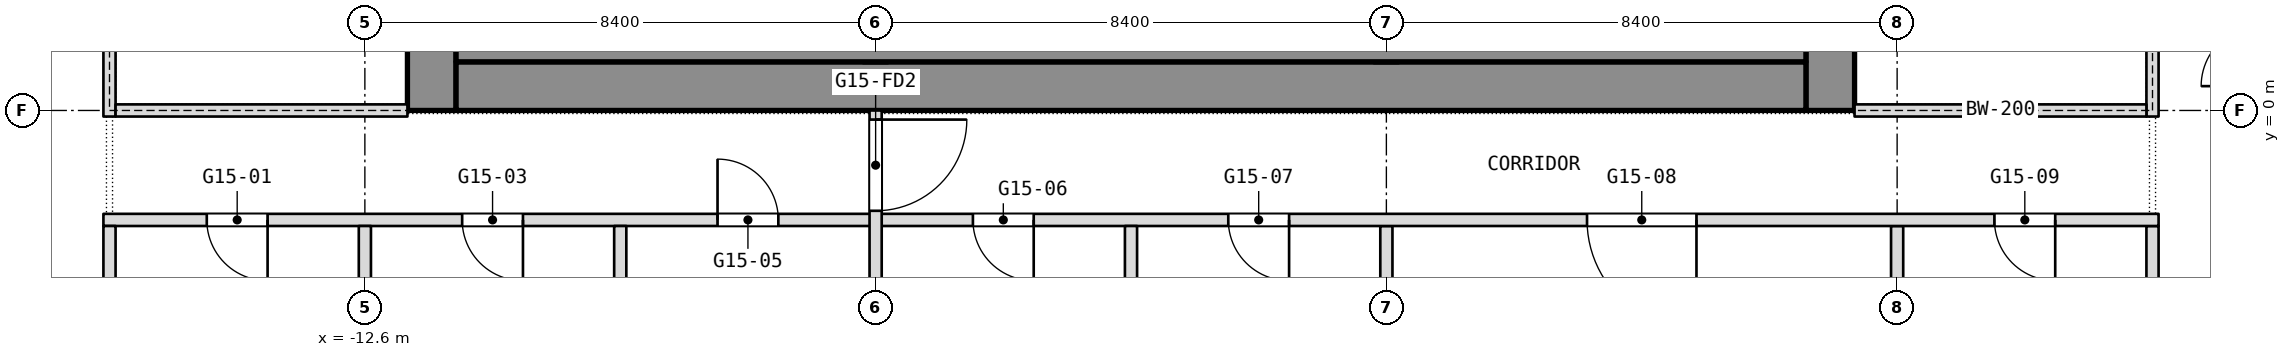
"""IFC4 building model, lengths in metres.
Left out: names, types, materials, properties, quantities, classifications, styles, units other than length and angle.
Written with IfcOpenShell. Run it as: python <this file> out.ifc"""

import sys

from ifc_helpers import new_model, si_unit, direction, frame, frame_2d, origin, place, context, subcontext, project, spatial, rectangle, extrude, element, fill, save


model = new_model("IFC4")
c1 = context("Model", 3, precision=1e-05, world=origin(), true_north=direction((0.0, 1.0)))
c2 = subcontext(c1, "Body", "Model", "MODEL_VIEW")
j1 = project(units=[si_unit("LENGTHUNIT", "METRE"), si_unit("PLANEANGLEUNIT", "RADIAN")], contexts=[c1])
p1 = place(None, origin())
s1 = spatial("IfcSite", under=j1, at=p1, CompositionType="ELEMENT")
p2 = place(p1, origin())
s2 = spatial("IfcBuilding", under=s1, at=p2, CompositionType="ELEMENT")
p3 = place(p2, frame((0.0, 0.0, 191.3)))
s3 = spatial("IfcBuildingStorey", under=s2, at=p3, CompositionType="ELEMENT", Elevation=191.3)
p4 = place(p3, frame((11.5, 0.0, 0.0), z_axis=(0.0, 0.0, 1.0), x_axis=(0.0, 1.0, 0.0)))
e1 = element("IfcWall", 1, at=p4, inside=s3, PredefinedType="SHEAR", context=c2, shape_type="SweptSolid", body=[
    extrude(rectangle(XDim=16.8, YDim=0.8, at=frame_2d((8.4, 0.0))), origin(), (0.0, 0.0, 1.0), 3.6),
])
p5 = place(p4, frame((2.3, 0.0, 0.0)))
e2 = element("IfcOpeningElement", 2, at=p5, cuts=e1, PredefinedType="OPENING", context=c2, shape_type="SweptSolid", body=[
    extrude(rectangle(XDim=1.1, YDim=2.1, at=frame_2d((0.55, 1.05))), frame((0.0, 0.4, 0.0), z_axis=(0.0, -1.0, 0.0), x_axis=(1.0, 0.0, 0.0)), (0.0, 0.0, 1.0), 0.8),
])
p6 = place(p4, frame((4.85, 0.0, 0.0)))
e3 = element("IfcOpeningElement", 3, at=p6, cuts=e1, PredefinedType="OPENING", context=c2, shape_type="SweptSolid", body=[
    extrude(rectangle(XDim=1.1, YDim=2.1, at=frame_2d((0.55, 1.05))), frame((0.0, 0.4, 0.0), z_axis=(0.0, -1.0, 0.0), x_axis=(1.0, 0.0, 0.0)), (0.0, 0.0, 1.0), 0.8),
])
p7 = place(p4, frame((6.825, 0.0, 0.0)))
e4 = element("IfcOpeningElement", 4, at=p7, cuts=e1, PredefinedType="OPENING", context=c2, shape_type="SweptSolid", body=[
    extrude(rectangle(XDim=1.2, YDim=2.1, at=frame_2d((0.6, 1.05))), frame((0.0, 0.4, 0.0), z_axis=(0.0, -1.0, 0.0), x_axis=(1.0, 0.0, 0.0)), (0.0, 0.0, 1.0), 0.8),
])
p8 = place(p4, frame((13.4, 0.0, 0.0)))
e5 = element("IfcOpeningElement", 5, at=p8, cuts=e1, PredefinedType="OPENING", context=c2, shape_type="SweptSolid", body=[
    extrude(rectangle(XDim=1.1, YDim=2.1, at=frame_2d((0.55, 1.05))), frame((0.0, 0.4, 0.0), z_axis=(0.0, -1.0, 0.0), x_axis=(1.0, 0.0, 0.0)), (0.0, 0.0, 1.0), 0.8),
])
p9 = place(p4, frame((10.85, 0.0, 0.0)))
e6 = element("IfcOpeningElement", 6, at=p9, cuts=e1, PredefinedType="OPENING", context=c2, shape_type="SweptSolid", body=[
    extrude(rectangle(XDim=1.1, YDim=2.1, at=frame_2d((0.55, 1.05))), frame((0.0, 0.4, 0.0), z_axis=(0.0, -1.0, 0.0), x_axis=(1.0, 0.0, 0.0)), (0.0, 0.0, 1.0), 0.8),
])
p10 = place(p4, frame((8.775, 0.0, 0.0)))
e7 = element("IfcOpeningElement", 7, at=p10, cuts=e1, PredefinedType="OPENING", context=c2, shape_type="SweptSolid", body=[
    extrude(rectangle(XDim=1.2, YDim=2.1, at=frame_2d((0.6, 1.05))), frame((0.0, 0.4, 0.0), z_axis=(0.0, -1.0, 0.0), x_axis=(1.0, 0.0, 0.0)), (0.0, 0.0, 1.0), 0.8),
])
p11 = place(p3, frame((-11.5, 0.0, 0.0), z_axis=(0.0, 0.0, 1.0), x_axis=(0.0, 1.0, 0.0)))
e8 = element("IfcWall", 8, at=p11, inside=s3, PredefinedType="SHEAR", context=c2, shape_type="SweptSolid", body=[
    extrude(rectangle(XDim=16.8, YDim=0.8, at=frame_2d((8.4, 0.0))), origin(), (0.0, 0.0, 1.0), 3.6),
])
p12 = place(p11, frame((3.6, 0.0, 0.0)))
e9 = element("IfcOpeningElement", 9, at=p12, cuts=e8, PredefinedType="OPENING", context=c2, shape_type="SweptSolid", body=[
    extrude(rectangle(XDim=0.9, YDim=2.1, at=frame_2d((0.45, 1.05))), frame((0.0, 0.4, 0.0), z_axis=(0.0, -1.0, 0.0), x_axis=(1.0, 0.0, 0.0)), (0.0, 0.0, 1.0), 0.8),
])
p13 = place(p11, frame((6.825, 0.0, 0.0)))
e10 = element("IfcOpeningElement", 10, at=p13, cuts=e8, PredefinedType="OPENING", context=c2, shape_type="SweptSolid", body=[
    extrude(rectangle(XDim=1.2, YDim=2.1, at=frame_2d((0.6, 1.05))), frame((0.0, 0.4, 0.0), z_axis=(0.0, -1.0, 0.0), x_axis=(1.0, 0.0, 0.0)), (0.0, 0.0, 1.0), 0.8),
])
p14 = place(p11, frame((14.212, 0.0, 0.0)))
e11 = element("IfcOpeningElement", 11, at=p14, cuts=e8, PredefinedType="OPENING", context=c2, shape_type="SweptSolid", body=[
    extrude(rectangle(XDim=0.9, YDim=2.1, at=frame_2d((0.45, 1.05))), frame((0.0, 0.4, 0.0), z_axis=(0.0, -1.0, 0.0), x_axis=(1.0, 0.0, 0.0)), (0.0, 0.0, 1.0), 0.8),
])
p15 = place(p11, frame((11.587, 0.0, 0.0)))
e12 = element("IfcOpeningElement", 12, at=p15, cuts=e8, PredefinedType="OPENING", context=c2, shape_type="SweptSolid", body=[
    extrude(rectangle(XDim=0.9, YDim=2.1, at=frame_2d((0.45, 1.05))), frame((0.0, 0.4, 0.0), z_axis=(0.0, -1.0, 0.0), x_axis=(1.0, 0.0, 0.0)), (0.0, 0.0, 1.0), 0.8),
])
p16 = place(p11, frame((8.775, 0.0, 0.0)))
e13 = element("IfcOpeningElement", 13, at=p16, cuts=e8, PredefinedType="OPENING", context=c2, shape_type="SweptSolid", body=[
    extrude(rectangle(XDim=1.2, YDim=2.1, at=frame_2d((0.6, 1.05))), frame((0.0, 0.4, 0.0), z_axis=(0.0, -1.0, 0.0), x_axis=(1.0, 0.0, 0.0)), (0.0, 0.0, 1.0), 0.8),
])
p17 = place(p3, frame((-11.1, 0.4, 0.0), z_axis=(0.0, 0.0, 1.0), x_axis=(1.0, 0.0, 0.0)))
e14 = element("IfcWall", 14, at=p17, inside=s3, PredefinedType="SHEAR", context=c2, shape_type="SweptSolid", body=[
    extrude(rectangle(XDim=22.2, YDim=0.8, at=frame_2d((11.1, 0.0))), origin(), (0.0, 0.0, 1.0), 3.6),
])
p18 = place(p3, frame((-4.2, 0.8, 0.0), z_axis=(0.0, 0.0, 1.0), x_axis=(0.0, 1.0, 0.0)))
e15 = element("IfcWall", 15, at=p18, inside=s3, PredefinedType="SHEAR", context=c2, shape_type="SweptSolid", body=[
    extrude(rectangle(XDim=15.2, YDim=0.4, at=frame_2d((7.6, 0.0))), origin(), (0.0, 0.0, 1.0), 3.6),
])
p19 = place(p18, frame((8.5, 0.0, 0.0)))
e16 = element("IfcOpeningElement", 16, at=p19, cuts=e15, PredefinedType="OPENING", context=c2, shape_type="SweptSolid", body=[
    extrude(rectangle(XDim=1.2, YDim=2.1, at=frame_2d((0.6, 1.05))), frame((0.0, 0.2, 0.0), z_axis=(0.0, -1.0, 0.0), x_axis=(1.0, 0.0, 0.0)), (0.0, 0.0, 1.0), 0.4),
])
p20 = place(p3, frame((4.2, 0.8, 0.0), z_axis=(0.0, 0.0, 1.0), x_axis=(0.0, 1.0, 0.0)))
e17 = element("IfcWall", 17, at=p20, inside=s3, PredefinedType="SHEAR", context=c2, shape_type="SweptSolid", body=[
    extrude(rectangle(XDim=15.2, YDim=0.4, at=frame_2d((7.6, 0.0))), origin(), (0.0, 0.0, 1.0), 3.6),
])
p21 = place(p20, frame((5.95, 0.0, 0.0)))
e18 = element("IfcOpeningElement", 18, at=p21, cuts=e17, PredefinedType="OPENING", context=c2, shape_type="SweptSolid", body=[
    extrude(rectangle(XDim=1.2, YDim=2.1, at=frame_2d((0.6, 1.05))), frame((0.0, 0.2, 0.0), z_axis=(0.0, -1.0, 0.0), x_axis=(1.0, 0.0, 0.0)), (0.0, 0.0, 1.0), 0.4),
])
for number, where, z_axis, x_axis in (
    (19, (16.8, -7.8, 0.0), (0.0, 0.0, 1.0), (0.0, 1.0, 0.0)),
    (20, (12.6, -7.8, 0.0), (0.0, 0.0, 1.0), (0.0, 1.0, 0.0)),
):
    element("IfcWall", number, at=place(p3, frame(where, z_axis=z_axis, x_axis=x_axis)), inside=s3, PredefinedType="PARTITIONING", context=c2, shape_type="SweptSolid", body=[
        extrude(rectangle(XDim=5.9, YDim=0.2, at=frame_2d((2.95, 0.0))), origin(), (0.0, 0.0, 1.0), 3.34),
    ])
p22 = place(p3, frame((4.2, -11.6, 0.0), z_axis=(0.0, 0.0, 1.0), x_axis=(0.0, 1.0, 0.0)))
e21 = element("IfcWall", 21, at=p22, inside=s3, PredefinedType="PARTITIONING", context=c2, shape_type="SweptSolid", body=[
    extrude(rectangle(XDim=9.7, YDim=0.2, at=frame_2d((4.85, 0.0))), origin(), (0.0, 0.0, 1.0), 3.34),
])
p23 = place(p3, frame((-16.9, -1.8, 0.0), z_axis=(0.0, 0.0, 1.0), x_axis=(1.0, 0.0, 0.0)))
e22 = element("IfcWall", 22, at=p23, inside=s3, PredefinedType="PARTITIONING", context=c2, shape_type="SweptSolid", body=[
    extrude(rectangle(XDim=33.8, YDim=0.2, at=frame_2d((16.9, 0.0))), origin(), (0.0, 0.0, 1.0), 3.34),
])
p24 = place(p23, frame((1.7, 0.0, 0.0)))
e23 = element("IfcOpeningElement", 23, at=p24, cuts=e22, PredefinedType="OPENING", context=c2, shape_type="SweptSolid", body=[
    extrude(rectangle(XDim=1.0, YDim=2.1, at=frame_2d((0.5, 1.05))), frame((0.0, 0.1, 0.0), z_axis=(0.0, -1.0, 0.0), x_axis=(1.0, 0.0, 0.0)), (0.0, 0.0, 1.0), 0.2),
])
p25 = place(p23, frame((5.9, 0.0, 0.0)))
e24 = element("IfcOpeningElement", 24, at=p25, cuts=e22, PredefinedType="OPENING", context=c2, shape_type="SweptSolid", body=[
    extrude(rectangle(XDim=1.0, YDim=2.1, at=frame_2d((0.5, 1.05))), frame((0.0, 0.1, 0.0), z_axis=(0.0, -1.0, 0.0), x_axis=(1.0, 0.0, 0.0)), (0.0, 0.0, 1.0), 0.2),
])
p26 = place(p23, frame((10.1, 0.0, 0.0)))
e25 = element("IfcOpeningElement", 25, at=p26, cuts=e22, PredefinedType="OPENING", context=c2, shape_type="SweptSolid", body=[
    extrude(rectangle(XDim=1.0, YDim=2.1, at=frame_2d((0.5, 1.05))), frame((0.0, 0.1, 0.0), z_axis=(0.0, -1.0, 0.0), x_axis=(1.0, 0.0, 0.0)), (0.0, 0.0, 1.0), 0.2),
])
p27 = place(p23, frame((14.3, 0.0, 0.0)))
e26 = element("IfcOpeningElement", 26, at=p27, cuts=e22, PredefinedType="OPENING", context=c2, shape_type="SweptSolid", body=[
    extrude(rectangle(XDim=1.0, YDim=2.1, at=frame_2d((0.5, 1.05))), frame((0.0, 0.1, 0.0), z_axis=(0.0, -1.0, 0.0), x_axis=(1.0, 0.0, 0.0)), (0.0, 0.0, 1.0), 0.2),
])
p28 = place(p23, frame((18.5, 0.0, 0.0)))
e27 = element("IfcOpeningElement", 27, at=p28, cuts=e22, PredefinedType="OPENING", context=c2, shape_type="SweptSolid", body=[
    extrude(rectangle(XDim=1.0, YDim=2.1, at=frame_2d((0.5, 1.05))), frame((0.0, 0.1, 0.0), z_axis=(0.0, -1.0, 0.0), x_axis=(1.0, 0.0, 0.0)), (0.0, 0.0, 1.0), 0.2),
])
p29 = place(p23, frame((24.4, 0.0, 0.0)))
e28 = element("IfcOpeningElement", 28, at=p29, cuts=e22, PredefinedType="OPENING", context=c2, shape_type="SweptSolid", body=[
    extrude(rectangle(XDim=1.8, YDim=2.1, at=frame_2d((0.9, 1.05))), frame((0.0, 0.1, 0.0), z_axis=(0.0, -1.0, 0.0), x_axis=(1.0, 0.0, 0.0)), (0.0, 0.0, 1.0), 0.2),
])
p30 = place(p23, frame((31.1, 0.0, 0.0)))
e29 = element("IfcOpeningElement", 29, at=p30, cuts=e22, PredefinedType="OPENING", context=c2, shape_type="SweptSolid", body=[
    extrude(rectangle(XDim=1.0, YDim=2.1, at=frame_2d((0.5, 1.05))), frame((0.0, 0.1, 0.0), z_axis=(0.0, -1.0, 0.0), x_axis=(1.0, 0.0, 0.0)), (0.0, 0.0, 1.0), 0.2),
])
p31 = place(p3, frame((0.0, -11.6, 0.0), z_axis=(0.0, 0.0, 1.0), x_axis=(0.0, 1.0, 0.0)))
e30 = element("IfcWall", 30, at=p31, inside=s3, PredefinedType="PARTITIONING", context=c2, shape_type="SweptSolid", body=[
    extrude(rectangle(XDim=9.7, YDim=0.2, at=frame_2d((4.85, 0.0))), origin(), (0.0, 0.0, 1.0), 3.34),
])
p32 = place(p3, frame((-4.2, -13.6, 0.0), z_axis=(0.0, 0.0, 1.0), x_axis=(0.0, 1.0, 0.0)))
e31 = element("IfcWall", 31, at=p32, inside=s3, PredefinedType="PARTITIONING", context=c2, shape_type="SweptSolid", body=[
    extrude(rectangle(XDim=13.6, YDim=0.2, at=frame_2d((6.8, 0.0))), origin(), (0.0, 0.0, 1.0), 3.34),
])
p33 = place(p32, frame((11.95, 0.0, 0.0)))
e32 = element("IfcOpeningElement", 32, at=p33, cuts=e31, PredefinedType="OPENING", context=c2, shape_type="SweptSolid", body=[
    extrude(rectangle(XDim=1.5, YDim=2.1, at=frame_2d((0.75, 1.05))), frame((0.0, 0.1, 0.0), z_axis=(0.0, -1.0, 0.0), x_axis=(1.0, 0.0, 0.0)), (0.0, 0.0, 1.0), 0.2),
])
p34 = place(p32, frame((0.25, 0.0, 0.0)))
e33 = element("IfcOpeningElement", 33, at=p34, cuts=e31, PredefinedType="OPENING", context=c2, shape_type="SweptSolid", body=[
    extrude(rectangle(XDim=1.5, YDim=2.1, at=frame_2d((0.75, 1.05))), frame((0.0, 0.1, 0.0), z_axis=(0.0, -1.0, 0.0), x_axis=(1.0, 0.0, 0.0)), (0.0, 0.0, 1.0), 0.2),
])
p35 = place(p3, frame((-8.4, -8.0, 0.0), z_axis=(0.0, 0.0, 1.0), x_axis=(0.0, 1.0, 0.0)))
e34 = element("IfcWall", 34, at=p35, inside=s3, PredefinedType="PARTITIONING", context=c2, shape_type="SweptSolid", body=[
    extrude(rectangle(XDim=6.1, YDim=0.2, at=frame_2d((3.05, 0.0))), origin(), (0.0, 0.0, 1.0), 3.34),
])
p36 = place(p3, frame((-12.6, -7.8, 0.0), z_axis=(0.0, 0.0, 1.0), x_axis=(0.0, 1.0, 0.0)))
e35 = element("IfcWall", 35, at=p36, inside=s3, PredefinedType="PARTITIONING", context=c2, shape_type="SweptSolid", body=[
    extrude(rectangle(XDim=5.9, YDim=0.2, at=frame_2d((2.95, 0.0))), origin(), (0.0, 0.0, 1.0), 3.34),
])
p37 = place(p3, frame((-16.8, -8.0, 0.0), z_axis=(0.0, 0.0, 1.0), x_axis=(0.0, 1.0, 0.0)))
e36 = element("IfcWall", 36, at=p37, inside=s3, PredefinedType="PARTITIONING", context=c2, shape_type="SweptSolid", body=[
    extrude(rectangle(XDim=6.1, YDim=0.2, at=frame_2d((3.05, 0.0))), origin(), (0.0, 0.0, 1.0), 3.34),
])
p38 = place(p3, frame((-11.1, 1.15, 0.0), z_axis=(0.0, 0.0, 1.0), x_axis=(1.0, 0.0, 0.0)))
e37 = element("IfcWall", 37, at=p38, inside=s3, PredefinedType="PARTITIONING", context=c2, shape_type="SweptSolid", body=[
    extrude(rectangle(XDim=22.2, YDim=0.7, at=frame_2d((11.1, 0.0))), origin(), (0.0, 0.0, 1.0), 3.34),
])
p39 = place(p3, frame((-16.8, -0.1, 0.0), z_axis=(0.0, 0.0, 1.0), x_axis=(0.0, 1.0, 0.0)))
e38 = element("IfcWall", 38, at=p39, inside=s3, PredefinedType="PARTITIONING", context=c2, shape_type="SweptSolid", body=[
    extrude(rectangle(XDim=17.0, YDim=0.2, at=frame_2d((8.5, 0.0))), origin(), (0.0, 0.0, 1.0), 3.34),
])
p40 = place(p39, frame((2.2, 0.0, 0.0)))
e39 = element("IfcOpeningElement", 39, at=p40, cuts=e38, PredefinedType="OPENING", context=c2, shape_type="SweptSolid", body=[
    extrude(rectangle(XDim=1.8, YDim=2.1, at=frame_2d((0.9, 1.05))), frame((0.0, 0.1, 0.0), z_axis=(0.0, -1.0, 0.0), x_axis=(1.0, 0.0, 0.0)), (0.0, 0.0, 1.0), 0.2),
])
p41 = place(p39, frame((13.0, 0.0, 0.0)))
e40 = element("IfcOpeningElement", 40, at=p41, cuts=e38, PredefinedType="OPENING", context=c2, shape_type="SweptSolid", body=[
    extrude(rectangle(XDim=1.8, YDim=2.1, at=frame_2d((0.9, 1.05))), frame((0.0, 0.1, 0.0), z_axis=(0.0, -1.0, 0.0), x_axis=(1.0, 0.0, 0.0)), (0.0, 0.0, 1.0), 0.2),
])
p42 = place(p3, frame((-16.7, 0.0, 0.0), z_axis=(0.0, 0.0, 1.0), x_axis=(1.0, 0.0, 0.0)))
e41 = element("IfcWall", 41, at=p42, inside=s3, PredefinedType="PARTITIONING", context=c2, shape_type="SweptSolid", body=[
    extrude(rectangle(XDim=4.8, YDim=0.2, at=frame_2d((2.4, 0.0))), origin(), (0.0, 0.0, 1.0), 2.94),
])
p43 = place(p3, frame((16.8, -0.1, 0.0), z_axis=(0.0, 0.0, 1.0), x_axis=(0.0, 1.0, 0.0)))
e42 = element("IfcWall", 42, at=p43, inside=s3, PredefinedType="PARTITIONING", context=c2, shape_type="SweptSolid", body=[
    extrude(rectangle(XDim=17.0, YDim=0.2, at=frame_2d((8.5, 0.0))), origin(), (0.0, 0.0, 1.0), 3.34),
])
p44 = place(p43, frame((2.2, 0.0, 0.0)))
e43 = element("IfcOpeningElement", 43, at=p44, cuts=e42, PredefinedType="OPENING", context=c2, shape_type="SweptSolid", body=[
    extrude(rectangle(XDim=1.8, YDim=2.1, at=frame_2d((0.9, 1.05))), frame((0.0, 0.1, 0.0), z_axis=(0.0, -1.0, 0.0), x_axis=(1.0, 0.0, 0.0)), (0.0, 0.0, 1.0), 0.2),
])
p45 = place(p43, frame((13.0, 0.0, 0.0)))
e44 = element("IfcOpeningElement", 44, at=p45, cuts=e42, PredefinedType="OPENING", context=c2, shape_type="SweptSolid", body=[
    extrude(rectangle(XDim=1.8, YDim=2.1, at=frame_2d((0.9, 1.05))), frame((0.0, 0.1, 0.0), z_axis=(0.0, -1.0, 0.0), x_axis=(1.0, 0.0, 0.0)), (0.0, 0.0, 1.0), 0.2),
])
p46 = place(p3, frame((11.9, 0.0, 0.0), z_axis=(0.0, 0.0, 1.0), x_axis=(1.0, 0.0, 0.0)))
e45 = element("IfcWall", 45, at=p46, inside=s3, PredefinedType="PARTITIONING", context=c2, shape_type="SweptSolid", body=[
    extrude(rectangle(XDim=4.8, YDim=0.2, at=frame_2d((2.4, 0.0))), origin(), (0.0, 0.0, 1.0), 2.94),
])
p47 = place(p24, origin())
e46 = element("IfcDoor", 46, at=p47, inside=s3, OperationType="SINGLE_SWING_LEFT", PredefinedType="DOOR", context=c2, shape_type="SweptSolid", body=[
    extrude(rectangle(XDim=1.0, YDim=2.1, at=frame_2d((0.5, 1.05))), frame((0.0, 0.025, 0.0), z_axis=(0.0, -1.0, 0.0), x_axis=(1.0, 0.0, 0.0)), (0.0, 0.0, 1.0), 0.05),
])
fill(e23, e46)
p48 = place(p25, origin())
e47 = element("IfcDoor", 47, at=p48, inside=s3, OperationType="SINGLE_SWING_LEFT", PredefinedType="DOOR", context=c2, shape_type="SweptSolid", body=[
    extrude(rectangle(XDim=1.0, YDim=2.1, at=frame_2d((0.5, 1.05))), frame((0.0, 0.025, 0.0), z_axis=(0.0, -1.0, 0.0), x_axis=(1.0, 0.0, 0.0)), (0.0, 0.0, 1.0), 0.05),
])
fill(e24, e47)
p49 = place(p26, origin())
e48 = element("IfcDoor", 48, at=p49, inside=s3, OperationType="SINGLE_SWING_RIGHT", PredefinedType="DOOR", context=c2, shape_type="SweptSolid", body=[
    extrude(rectangle(XDim=1.0, YDim=2.1, at=frame_2d((0.5, 1.05))), frame((0.0, 0.025, 0.0), z_axis=(0.0, -1.0, 0.0), x_axis=(1.0, 0.0, 0.0)), (0.0, 0.0, 1.0), 0.05),
])
fill(e25, e48)
p50 = place(p27, origin())
e49 = element("IfcDoor", 49, at=p50, inside=s3, OperationType="SINGLE_SWING_LEFT", PredefinedType="DOOR", context=c2, shape_type="SweptSolid", body=[
    extrude(rectangle(XDim=1.0, YDim=2.1, at=frame_2d((0.5, 1.05))), frame((0.0, 0.025, 0.0), z_axis=(0.0, -1.0, 0.0), x_axis=(1.0, 0.0, 0.0)), (0.0, 0.0, 1.0), 0.05),
])
fill(e26, e49)
p51 = place(p28, origin())
e50 = element("IfcDoor", 50, at=p51, inside=s3, OperationType="SINGLE_SWING_RIGHT", PredefinedType="DOOR", context=c2, shape_type="SweptSolid", body=[
    extrude(rectangle(XDim=1.0, YDim=2.1, at=frame_2d((0.5, 1.05))), frame((0.0, 0.025, 0.0), z_axis=(0.0, -1.0, 0.0), x_axis=(1.0, 0.0, 0.0)), (0.0, 0.0, 1.0), 0.05),
])
fill(e27, e50)
p52 = place(p29, origin())
e51 = element("IfcDoor", 51, at=p52, inside=s3, OperationType="DOUBLE_DOOR_SINGLE_SWING", PredefinedType="DOOR", context=c2, shape_type="SweptSolid", body=[
    extrude(rectangle(XDim=1.8, YDim=2.1, at=frame_2d((0.9, 1.05))), frame((0.0, 0.025, 0.0), z_axis=(0.0, -1.0, 0.0), x_axis=(1.0, 0.0, 0.0)), (0.0, 0.0, 1.0), 0.05),
])
fill(e28, e51)
p53 = place(p30, origin())
e52 = element("IfcDoor", 52, at=p53, inside=s3, OperationType="SINGLE_SWING_RIGHT", PredefinedType="DOOR", context=c2, shape_type="SweptSolid", body=[
    extrude(rectangle(XDim=1.0, YDim=2.1, at=frame_2d((0.5, 1.05))), frame((0.0, 0.025, 0.0), z_axis=(0.0, -1.0, 0.0), x_axis=(1.0, 0.0, 0.0)), (0.0, 0.0, 1.0), 0.05),
])
fill(e29, e52)
p54 = place(p33, origin())
e53 = element("IfcDoor", 53, at=p54, inside=s3, OperationType="DOUBLE_DOOR_DOUBLE_SWING", PredefinedType="DOOR", context=c2, shape_type="SweptSolid", body=[
    extrude(rectangle(XDim=1.5, YDim=2.1, at=frame_2d((0.75, 1.05))), frame((0.0, 0.025, 0.0), z_axis=(0.0, -1.0, 0.0), x_axis=(1.0, 0.0, 0.0)), (0.0, 0.0, 1.0), 0.05),
])
fill(e32, e53)
save(model, sys.argv[1])
